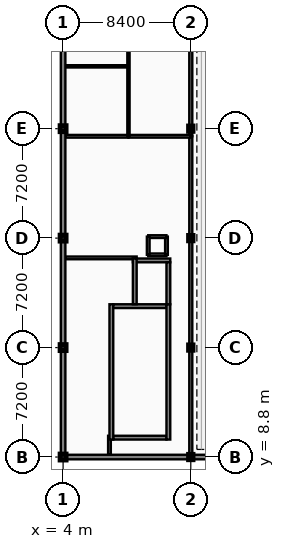
"""IFC4 building model, lengths in metres.
Left out: names, types, materials, properties, quantities, classifications, styles, units other than length and angle.
Written with IfcOpenShell. Run it as: python <this file> out.ifc"""

import sys

from ifc_helpers import new_model, si_unit, direction, frame, frame_2d, origin, origin_2d, place, context, subcontext, project, spatial, rectangle, i_section, extrude, element, fill, save


model = new_model("IFC4")
c1 = context("Model", 3, precision=1e-05, world=origin(), true_north=direction((0.0, 1.0)))
c2 = subcontext(c1, "Body", "Model", "MODEL_VIEW")
j1 = project(units=[si_unit("LENGTHUNIT", "METRE"), si_unit("PLANEANGLEUNIT", "RADIAN")], contexts=[c1])
p1 = place(None, origin())
s1 = spatial("IfcSite", under=j1, at=p1, CompositionType="ELEMENT")
p2 = place(p1, origin())
s2 = spatial("IfcBuilding", under=s1, at=p2, CompositionType="ELEMENT")
p3 = place(p2, frame((0.0, 0.0, 5.4)))
s3 = spatial("IfcBuildingStorey", under=s2, at=p3, CompositionType="ELEMENT", Elevation=5.4)
for number, where, z_axis, x_axis in (
    (1, (4.0, 8.8, 0.0), (0.0, 0.0, 1.0), (1.0, 0.0, 0.0)),
    (2, (4.0, 16.0, 0.0), (0.0, 0.0, 1.0), (1.0, 0.0, 0.0)),
    (3, (4.0, 23.2, 0.0), (0.0, 0.0, 1.0), (1.0, 0.0, 0.0)),
    (4, (4.0, 30.4, 0.0), (0.0, 0.0, 1.0), (1.0, 0.0, 0.0)),
):
    element("IfcColumn", number, at=place(p3, frame(where, z_axis=z_axis, x_axis=x_axis)), inside=s3, PredefinedType="COLUMN", context=c2, shape_type="SweptSolid", body=[
        extrude(rectangle(XDim=0.4, YDim=0.4, at=origin_2d()), origin(), (0.0, 0.0, 1.0), 4.2),
    ])
for number, where, z_axis, x_axis in (
    (5, (12.4, 8.8, 0.0), (0.0, 0.0, 1.0), (1.0, 0.0, 0.0)),
    (6, (12.4, 16.0, 0.0), (0.0, 0.0, 1.0), (1.0, 0.0, 0.0)),
    (7, (12.4, 23.2, 0.0), (0.0, 0.0, 1.0), (1.0, 0.0, 0.0)),
    (8, (12.4, 30.4, 0.0), (0.0, 0.0, 1.0), (1.0, 0.0, 0.0)),
):
    element("IfcColumn", number, at=place(p3, frame(where, z_axis=z_axis, x_axis=x_axis)), inside=s3, PredefinedType="COLUMN", context=c2, shape_type="SweptSolid", body=[
        extrude(i_section(OverallWidth=0.3, OverallDepth=0.36, WebThickness=0.012, FlangeThickness=0.022, at=origin_2d()), origin(), (0.0, 0.0, 1.0), 4.2),
    ])
p4 = place(p3, frame((7.05, 8.96, 0.0), z_axis=(0.0, 0.0, 1.0), x_axis=(0.0, 1.0, 0.0)))
e9 = element("IfcWall", 9, at=p4, inside=s3, PredefinedType="PARTITIONING", context=c2, shape_type="SweptSolid", body=[
    extrude(rectangle(XDim=1.24, YDim=0.18, at=frame_2d((0.62, 0.0))), origin(), (0.0, 0.0, 1.0), 3.5),
])
p5 = place(p3, frame((4.16, 21.9, 0.0), z_axis=(0.0, 0.0, 1.0), x_axis=(1.0, 0.0, 0.0)))
e10 = element("IfcWall", 10, at=p5, inside=s3, PredefinedType="PARTITIONING", context=c2, shape_type="SweptSolid", body=[
    extrude(rectangle(XDim=4.68, YDim=0.18, at=frame_2d((2.34, 0.0))), origin(), (0.0, 0.0, 1.0), 3.5),
])
p6 = place(p3, frame((12.4, 8.96, 0.0), z_axis=(0.0, 0.0, 1.0), x_axis=(0.0, 1.0, 0.0)))
e11 = element("IfcWall", 11, at=p6, inside=s3, PredefinedType="PARTITIONING", context=c2, shape_type="SweptSolid", body=[
    extrude(rectangle(XDim=20.94, YDim=0.2, at=frame_2d((10.47, 0.0))), origin(), (0.0, 0.0, 1.0), 3.35),
])
p7 = place(p6, frame((8.613, 0.0, -0.01)))
e12 = element("IfcOpeningElement", 12, at=p7, cuts=e11, PredefinedType="OPENING", context=c2, shape_type="SweptSolid", body=[
    extrude(rectangle(XDim=1.8, YDim=2.26, at=frame_2d((0.9, 1.13))), frame((0.0, 0.11, 0.0), z_axis=(0.0, -1.0, 0.0), x_axis=(1.0, 0.0, 0.0)), (0.0, 0.0, 1.0), 0.22),
])
p8 = place(p3, frame((12.4, 29.9, 0.0), z_axis=(0.0, 0.0, 1.0), x_axis=(0.0, 1.0, 0.0)))
e13 = element("IfcWall", 13, at=p8, inside=s3, PredefinedType="PARTITIONING", context=c2, shape_type="SweptSolid", body=[
    extrude(rectangle(XDim=7.56, YDim=0.2, at=frame_2d((3.78, 0.0))), origin(), (0.0, 0.0, 1.0), 3.23),
])
p9 = place(p3, frame((4.16, 29.9, 0.0), z_axis=(0.0, 0.0, 1.0), x_axis=(1.0, 0.0, 0.0)))
e14 = element("IfcWall", 14, at=p9, inside=s3, PredefinedType="PARTITIONING", context=c2, shape_type="SweptSolid", body=[
    extrude(rectangle(XDim=4.14, YDim=0.18, at=frame_2d((2.07, 0.0))), origin(), (0.0, 0.0, 1.0), 3.5),
])
p10 = place(p9, frame((1.57, 0.0, -0.01)))
e15 = element("IfcOpeningElement", 15, at=p10, cuts=e14, PredefinedType="OPENING", context=c2, shape_type="SweptSolid", body=[
    extrude(rectangle(XDim=1.0, YDim=2.16, at=frame_2d((0.5, 1.08))), frame((0.0, 0.1, 0.0), z_axis=(0.0, -1.0, 0.0), x_axis=(1.0, 0.0, 0.0)), (0.0, 0.0, 1.0), 0.2),
])
p11 = place(p3, frame((8.3, 29.9, 0.0), z_axis=(0.0, 0.0, 1.0), x_axis=(1.0, 0.0, 0.0)))
e16 = element("IfcWall", 16, at=p11, inside=s3, PredefinedType="PARTITIONING", context=c2, shape_type="SweptSolid", body=[
    extrude(rectangle(XDim=4.1, YDim=0.18, at=frame_2d((2.05, 0.0))), origin(), (0.0, 0.0, 1.0), 3.35),
])
p12 = place(p11, frame((1.55, 0.0, -0.01)))
e17 = element("IfcOpeningElement", 17, at=p12, cuts=e16, PredefinedType="OPENING", context=c2, shape_type="SweptSolid", body=[
    extrude(rectangle(XDim=1.0, YDim=2.16, at=frame_2d((0.5, 1.08))), frame((0.0, 0.1, 0.0), z_axis=(0.0, -1.0, 0.0), x_axis=(1.0, 0.0, 0.0)), (0.0, 0.0, 1.0), 0.2),
])
p13 = place(p3, frame((8.3, 29.9, 0.0), z_axis=(0.0, 0.0, 1.0), x_axis=(0.0, 1.0, 0.0)))
e18 = element("IfcWall", 18, at=p13, inside=s3, PredefinedType="PARTITIONING", context=c2, shape_type="SweptSolid", body=[
    extrude(rectangle(XDim=7.56, YDim=0.15, at=frame_2d((3.78, 0.0))), origin(), (0.0, 0.0, 1.0), 3.23),
])
p14 = place(p3, frame((4.16, 34.5, 0.0), z_axis=(0.0, 0.0, 1.0), x_axis=(1.0, 0.0, 0.0)))
e19 = element("IfcWall", 19, at=p14, inside=s3, PredefinedType="PARTITIONING", context=c2, shape_type="SweptSolid", body=[
    extrude(rectangle(XDim=4.14, YDim=0.15, at=frame_2d((2.07, 0.0))), origin(), (0.0, 0.0, 1.0), 3.5),
])
p15 = place(p14, frame((1.595, 0.0, -0.01)))
e20 = element("IfcOpeningElement", 20, at=p15, cuts=e19, PredefinedType="OPENING", context=c2, shape_type="SweptSolid", body=[
    extrude(rectangle(XDim=0.95, YDim=2.16, at=frame_2d((0.475, 1.08))), frame((0.0, 0.085, 0.0), z_axis=(0.0, -1.0, 0.0), x_axis=(1.0, 0.0, 0.0)), (0.0, 0.0, 1.0), 0.17),
])
p16 = place(p3, frame((4.0, 8.8, 0.0), z_axis=(0.0, 0.0, 1.0), x_axis=(1.0, 0.0, 0.0)))
e21 = element("IfcWall", 21, at=p16, inside=s3, PredefinedType="SOLIDWALL", context=c2, shape_type="SweptSolid", body=[
    extrude(rectangle(XDim=8.4, YDim=0.3, at=frame_2d((4.2, 0.0))), origin(), (0.0, 0.0, 1.0), 3.35),
])
p17 = place(p16, frame((0.46, 0.0, 0.85)))
e22 = element("IfcOpeningElement", 22, at=p17, cuts=e21, PredefinedType="OPENING", context=c2, shape_type="SweptSolid", body=[
    extrude(rectangle(XDim=0.9, YDim=2.15, at=frame_2d((0.45, 1.075))), frame((0.0, 0.16, 0.0), z_axis=(0.0, -1.0, 0.0), x_axis=(1.0, 0.0, 0.0)), (0.0, 0.0, 1.0), 0.32),
])
p18 = place(p16, frame((6.86, 0.0, 0.85)))
e23 = element("IfcOpeningElement", 23, at=p18, cuts=e21, PredefinedType="OPENING", context=c2, shape_type="SweptSolid", body=[
    extrude(rectangle(XDim=0.9, YDim=2.15, at=frame_2d((0.45, 1.075))), frame((0.0, 0.16, 0.0), z_axis=(0.0, -1.0, 0.0), x_axis=(1.0, 0.0, 0.0)), (0.0, 0.0, 1.0), 0.32),
])
p19 = place(p3, frame((12.4, 8.8, 0.0), z_axis=(0.0, 0.0, 1.0), x_axis=(1.0, 0.0, 0.0)))
e24 = element("IfcWall", 24, at=p19, inside=s3, PredefinedType="SOLIDWALL", context=c2, shape_type="SweptSolid", body=[
    extrude(rectangle(XDim=8.4, YDim=0.3, at=frame_2d((4.2, 0.0))), origin(), (0.0, 0.0, 1.0), 3.35),
])
p20 = place(p19, frame((0.46, 0.0, 0.85)))
e25 = element("IfcOpeningElement", 25, at=p20, cuts=e24, PredefinedType="OPENING", context=c2, shape_type="SweptSolid", body=[
    extrude(rectangle(XDim=0.9, YDim=2.15, at=frame_2d((0.45, 1.075))), frame((0.0, 0.16, 0.0), z_axis=(0.0, -1.0, 0.0), x_axis=(1.0, 0.0, 0.0)), (0.0, 0.0, 1.0), 0.32),
])
p21 = place(p19, frame((6.86, 0.0, 0.85)))
e26 = element("IfcOpeningElement", 26, at=p21, cuts=e24, PredefinedType="OPENING", context=c2, shape_type="SweptSolid", body=[
    extrude(rectangle(XDim=0.9, YDim=2.15, at=frame_2d((0.45, 1.075))), frame((0.0, 0.16, 0.0), z_axis=(0.0, -1.0, 0.0), x_axis=(1.0, 0.0, 0.0)), (0.0, 0.0, 1.0), 0.32),
])
for number, where, z_axis, x_axis in (
    (27, (4.0, 16.0, 0.0), (0.0, 0.0, 1.0), (0.0, -1.0, 0.0)),
    (28, (4.0, 23.2, 0.0), (0.0, 0.0, 1.0), (0.0, -1.0, 0.0)),
):
    element("IfcWall", number, at=place(p3, frame(where, z_axis=z_axis, x_axis=x_axis)), inside=s3, PredefinedType="SOLIDWALL", context=c2, shape_type="SweptSolid", body=[
        extrude(rectangle(XDim=7.2, YDim=0.3, at=frame_2d((3.6, 0.0))), origin(), (0.0, 0.0, 1.0), 3.5),
    ])
p22 = place(p3, frame((4.0, 30.4, 0.0), z_axis=(0.0, 0.0, 1.0), x_axis=(0.0, -1.0, 0.0)))
e29 = element("IfcWall", 29, at=p22, inside=s3, PredefinedType="SOLIDWALL", context=c2, shape_type="SweptSolid", body=[
    extrude(rectangle(XDim=7.2, YDim=0.3, at=frame_2d((3.6, 0.0))), origin(), (0.0, 0.0, 1.0), 3.23),
])
p23 = place(p22, frame((0.86, 0.0, 0.85)))
e30 = element("IfcOpeningElement", 30, at=p23, cuts=e29, PredefinedType="OPENING", context=c2, shape_type="SweptSolid", body=[
    extrude(rectangle(XDim=0.9, YDim=2.15, at=frame_2d((0.45, 1.075))), frame((0.0, 0.16, 0.0), z_axis=(0.0, -1.0, 0.0), x_axis=(1.0, 0.0, 0.0)), (0.0, 0.0, 1.0), 0.32),
])
p24 = place(p22, frame((5.66, 0.0, 0.85)))
e31 = element("IfcOpeningElement", 31, at=p24, cuts=e29, PredefinedType="OPENING", context=c2, shape_type="SweptSolid", body=[
    extrude(rectangle(XDim=0.9, YDim=2.15, at=frame_2d((0.45, 1.075))), frame((0.0, 0.16, 0.0), z_axis=(0.0, -1.0, 0.0), x_axis=(1.0, 0.0, 0.0)), (0.0, 0.0, 1.0), 0.32),
])
p25 = place(p3, frame((4.0, 37.6, 0.0), z_axis=(0.0, 0.0, 1.0), x_axis=(0.0, -1.0, 0.0)))
e32 = element("IfcWall", 32, at=p25, inside=s3, PredefinedType="SOLIDWALL", context=c2, shape_type="SweptSolid", body=[
    extrude(rectangle(XDim=7.2, YDim=0.3, at=frame_2d((3.6, 0.0))), origin(), (0.0, 0.0, 1.0), 3.23),
])
p26 = place(p25, frame((0.46, 0.0, 0.85)))
e33 = element("IfcOpeningElement", 33, at=p26, cuts=e32, PredefinedType="OPENING", context=c2, shape_type="SweptSolid", body=[
    extrude(rectangle(XDim=0.9, YDim=2.15, at=frame_2d((0.45, 1.075))), frame((0.0, 0.16, 0.0), z_axis=(0.0, -1.0, 0.0), x_axis=(1.0, 0.0, 0.0)), (0.0, 0.0, 1.0), 0.32),
])
p27 = place(p25, frame((5.66, 0.0, 0.85)))
e34 = element("IfcOpeningElement", 34, at=p27, cuts=e32, PredefinedType="OPENING", context=c2, shape_type="SweptSolid", body=[
    extrude(rectangle(XDim=0.9, YDim=2.15, at=frame_2d((0.45, 1.075))), frame((0.0, 0.16, 0.0), z_axis=(0.0, -1.0, 0.0), x_axis=(1.0, 0.0, 0.0)), (0.0, 0.0, 1.0), 0.32),
])
p28 = place(p3, frame((7.3, 10.075, 0.0), z_axis=(0.0, 0.0, 1.0), x_axis=(1.0, 0.0, 0.0)))
e35 = element("IfcWall", 35, at=p28, inside=s3, PredefinedType="SHEAR", context=c2, shape_type="SweptSolid", body=[
    extrude(rectangle(XDim=3.5, YDim=0.25, at=frame_2d((1.75, 0.0))), origin(), (0.0, 0.0, 1.0), 4.2),
])
p29 = place(p28, frame((1.1, 0.0, -0.01)))
e36 = element("IfcOpeningElement", 36, at=p29, cuts=e35, PredefinedType="OPENING", context=c2, shape_type="SweptSolid", body=[
    extrude(rectangle(XDim=1.3, YDim=2.16, at=frame_2d((0.65, 1.08))), frame((0.0, 0.135, 0.0), z_axis=(0.0, -1.0, 0.0), x_axis=(1.0, 0.0, 0.0)), (0.0, 0.0, 1.0), 0.27),
])
p30 = place(p3, frame((7.175, 9.95, 0.0), z_axis=(0.0, 0.0, 1.0), x_axis=(0.0, 1.0, 0.0)))
e37 = element("IfcWall", 37, at=p30, inside=s3, PredefinedType="SHEAR", context=c2, shape_type="SweptSolid", body=[
    extrude(rectangle(XDim=8.9, YDim=0.25, at=frame_2d((4.45, 0.0))), origin(), (0.0, 0.0, 1.0), 4.2),
])
p31 = place(p3, frame((10.8, 18.725, 0.0), z_axis=(0.0, 0.0, 1.0), x_axis=(-1.0, 0.0, 0.0)))
e38 = element("IfcWall", 38, at=p31, inside=s3, PredefinedType="SHEAR", context=c2, shape_type="SweptSolid", body=[
    extrude(rectangle(XDim=3.5, YDim=0.25, at=frame_2d((1.75, 0.0))), origin(), (0.0, 0.0, 1.0), 4.2),
])
p32 = place(p3, frame((10.925, 9.95, 0.0), z_axis=(0.0, 0.0, 1.0), x_axis=(0.0, 1.0, 0.0)))
e39 = element("IfcWall", 39, at=p32, inside=s3, PredefinedType="SHEAR", context=c2, shape_type="SweptSolid", body=[
    extrude(rectangle(XDim=8.9, YDim=0.25, at=frame_2d((4.45, 0.0))), origin(), (0.0, 0.0, 1.0), 4.2),
])
p33 = place(p3, frame((8.59, 21.735, 0.0), z_axis=(0.0, 0.0, 1.0), x_axis=(1.0, 0.0, 0.0)))
e40 = element("IfcWall", 40, at=p33, inside=s3, PredefinedType="SHEAR", context=c2, shape_type="SweptSolid", body=[
    extrude(rectangle(XDim=2.46, YDim=0.25, at=frame_2d((1.23, 0.0))), origin(), (0.0, 0.0, 1.0), 4.2),
])
p34 = place(p3, frame((10.925, 18.85, 0.0), z_axis=(0.0, 0.0, 1.0), x_axis=(0.0, 1.0, 0.0)))
e41 = element("IfcWall", 41, at=p34, inside=s3, PredefinedType="SHEAR", context=c2, shape_type="SweptSolid", body=[
    extrude(rectangle(XDim=2.76, YDim=0.25, at=frame_2d((1.38, 0.0))), origin(), (0.0, 0.0, 1.0), 4.2),
])
p35 = place(p34, frame((0.83, 0.0, -0.01)))
e42 = element("IfcOpeningElement", 42, at=p35, cuts=e41, PredefinedType="OPENING", context=c2, shape_type="SweptSolid", body=[
    extrude(rectangle(XDim=1.1, YDim=2.16, at=frame_2d((0.55, 1.08))), frame((0.0, 0.135, 0.0), z_axis=(0.0, -1.0, 0.0), x_axis=(1.0, 0.0, 0.0)), (0.0, 0.0, 1.0), 0.27),
])
p36 = place(p3, frame((8.715, 18.85, 0.0), z_axis=(0.0, 0.0, 1.0), x_axis=(0.0, 1.0, 0.0)))
e43 = element("IfcWall", 43, at=p36, inside=s3, PredefinedType="SHEAR", context=c2, shape_type="SweptSolid", body=[
    extrude(rectangle(XDim=3.01, YDim=0.25, at=frame_2d((1.505, 0.0))), origin(), (0.0, 0.0, 1.0), 4.2),
])
p37 = place(p3, frame((9.6, 22.1, 0.0), z_axis=(0.0, 0.0, 1.0), x_axis=(1.0, 0.0, 0.0)))
e44 = element("IfcWall", 44, at=p37, inside=s3, PredefinedType="SOLIDWALL", context=c2, shape_type="SweptSolid", body=[
    extrude(rectangle(XDim=1.2, YDim=0.18, at=frame_2d((0.6, 0.0))), origin(), (0.0, 0.0, 1.0), 3.97),
])
p38 = place(p3, frame((10.8, 22.1, 0.0), z_axis=(0.0, 0.0, 1.0), x_axis=(0.0, 1.0, 0.0)))
e45 = element("IfcWall", 45, at=p38, inside=s3, PredefinedType="SOLIDWALL", context=c2, shape_type="SweptSolid", body=[
    extrude(rectangle(XDim=1.2, YDim=0.18, at=frame_2d((0.6, 0.0))), origin(), (0.0, 0.0, 1.0), 3.97),
])
p39 = place(p38, frame((0.2, 0.0, -0.01)))
e46 = element("IfcOpeningElement", 46, at=p39, cuts=e45, PredefinedType="OPENING", context=c2, shape_type="SweptSolid", body=[
    extrude(rectangle(XDim=0.8, YDim=2.06, at=frame_2d((0.4, 1.03))), frame((0.0, 0.1, 0.0), z_axis=(0.0, -1.0, 0.0), x_axis=(1.0, 0.0, 0.0)), (0.0, 0.0, 1.0), 0.2),
])
for number, where, z_axis, x_axis in (
    (47, (10.8, 23.3, 0.0), (0.0, 0.0, 1.0), (-1.0, 0.0, 0.0)),
    (48, (9.6, 23.3, 0.0), (0.0, 0.0, 1.0), (0.0, -1.0, 0.0)),
):
    element("IfcWall", number, at=place(p3, frame(where, z_axis=z_axis, x_axis=x_axis)), inside=s3, PredefinedType="SOLIDWALL", context=c2, shape_type="SweptSolid", body=[
        extrude(rectangle(XDim=1.2, YDim=0.18, at=frame_2d((0.6, 0.0))), origin(), (0.0, 0.0, 1.0), 3.97),
    ])
p40 = place(p7, frame((1.8, 0.0, 0.01), z_axis=(0.0, 0.0, 1.0), x_axis=(-1.0, 0.0, 0.0)))
e49 = element("IfcDoor", 49, at=p40, inside=s3, OperationType="DOUBLE_SWING_LEFT", PredefinedType="DOOR", context=c2, shape_type="SweptSolid", body=[
    extrude(rectangle(XDim=1.8, YDim=2.25, at=frame_2d((0.9, 1.125))), frame((0.0, 0.025, 0.0), z_axis=(0.0, -1.0, 0.0), x_axis=(1.0, 0.0, 0.0)), (0.0, 0.0, 1.0), 0.05),
])
fill(e12, e49)
p41 = place(p10, frame((0.0, 0.0, 0.01)))
e50 = element("IfcDoor", 50, at=p41, inside=s3, OperationType="SINGLE_SWING_LEFT", PredefinedType="DOOR", context=c2, shape_type="SweptSolid", body=[
    extrude(rectangle(XDim=1.0, YDim=2.15, at=frame_2d((0.5, 1.075))), frame((0.0, 0.025, 0.0), z_axis=(0.0, -1.0, 0.0), x_axis=(1.0, 0.0, 0.0)), (0.0, 0.0, 1.0), 0.05),
])
fill(e15, e50)
p42 = place(p12, frame((0.0, 0.0, 0.01)))
e51 = element("IfcDoor", 51, at=p42, inside=s3, OperationType="SINGLE_SWING_RIGHT", PredefinedType="DOOR", context=c2, shape_type="SweptSolid", body=[
    extrude(rectangle(XDim=1.0, YDim=2.15, at=frame_2d((0.5, 1.075))), frame((0.0, 0.025, 0.0), z_axis=(0.0, -1.0, 0.0), x_axis=(1.0, 0.0, 0.0)), (0.0, 0.0, 1.0), 0.05),
])
fill(e17, e51)
p43 = place(p15, frame((0.95, 0.0, 0.01), z_axis=(0.0, 0.0, 1.0), x_axis=(-1.0, 0.0, 0.0)))
e52 = element("IfcDoor", 52, at=p43, inside=s3, OperationType="SINGLE_SWING_LEFT", PredefinedType="DOOR", context=c2, shape_type="SweptSolid", body=[
    extrude(rectangle(XDim=0.95, YDim=2.15, at=frame_2d((0.475, 1.075))), frame((0.0, 0.025, 0.0), z_axis=(0.0, -1.0, 0.0), x_axis=(1.0, 0.0, 0.0)), (0.0, 0.0, 1.0), 0.05),
])
fill(e20, e52)
p44 = place(p17, origin())
e53 = element("IfcWindow", 53, at=p44, inside=s3, PartitioningType="SINGLE_PANEL", PredefinedType="WINDOW", context=c2, shape_type="SweptSolid", body=[
    extrude(rectangle(XDim=0.9, YDim=2.15, at=frame_2d((0.45, 1.075))), frame((0.0, 0.03, 0.0), z_axis=(0.0, -1.0, 0.0), x_axis=(1.0, 0.0, 0.0)), (0.0, 0.0, 1.0), 0.06),
])
fill(e22, e53)
p45 = place(p18, origin())
e54 = element("IfcWindow", 54, at=p45, inside=s3, PartitioningType="SINGLE_PANEL", PredefinedType="WINDOW", context=c2, shape_type="SweptSolid", body=[
    extrude(rectangle(XDim=0.9, YDim=2.15, at=frame_2d((0.45, 1.075))), frame((0.0, 0.03, 0.0), z_axis=(0.0, -1.0, 0.0), x_axis=(1.0, 0.0, 0.0)), (0.0, 0.0, 1.0), 0.06),
])
fill(e23, e54)
p46 = place(p20, origin())
e55 = element("IfcWindow", 55, at=p46, inside=s3, PartitioningType="SINGLE_PANEL", PredefinedType="WINDOW", context=c2, shape_type="SweptSolid", body=[
    extrude(rectangle(XDim=0.9, YDim=2.15, at=frame_2d((0.45, 1.075))), frame((0.0, 0.03, 0.0), z_axis=(0.0, -1.0, 0.0), x_axis=(1.0, 0.0, 0.0)), (0.0, 0.0, 1.0), 0.06),
])
fill(e25, e55)
p47 = place(p23, origin())
e56 = element("IfcWindow", 56, at=p47, inside=s3, PartitioningType="SINGLE_PANEL", PredefinedType="WINDOW", context=c2, shape_type="SweptSolid", body=[
    extrude(rectangle(XDim=0.9, YDim=2.15, at=frame_2d((0.45, 1.075))), frame((0.0, 0.03, 0.0), z_axis=(0.0, -1.0, 0.0), x_axis=(1.0, 0.0, 0.0)), (0.0, 0.0, 1.0), 0.06),
])
fill(e30, e56)
p48 = place(p24, origin())
e57 = element("IfcWindow", 57, at=p48, inside=s3, PartitioningType="SINGLE_PANEL", PredefinedType="WINDOW", context=c2, shape_type="SweptSolid", body=[
    extrude(rectangle(XDim=0.9, YDim=2.15, at=frame_2d((0.45, 1.075))), frame((0.0, 0.03, 0.0), z_axis=(0.0, -1.0, 0.0), x_axis=(1.0, 0.0, 0.0)), (0.0, 0.0, 1.0), 0.06),
])
fill(e31, e57)
p49 = place(p27, origin())
e58 = element("IfcWindow", 58, at=p49, inside=s3, PartitioningType="SINGLE_PANEL", PredefinedType="WINDOW", context=c2, shape_type="SweptSolid", body=[
    extrude(rectangle(XDim=0.9, YDim=2.15, at=frame_2d((0.45, 1.075))), frame((0.0, 0.03, 0.0), z_axis=(0.0, -1.0, 0.0), x_axis=(1.0, 0.0, 0.0)), (0.0, 0.0, 1.0), 0.06),
])
fill(e34, e58)
p50 = place(p29, frame((0.0, 0.0, 0.01)))
e59 = element("IfcDoor", 59, at=p50, inside=s3, OperationType="SINGLE_SWING_RIGHT", PredefinedType="DOOR", context=c2, shape_type="SweptSolid", body=[
    extrude(rectangle(XDim=1.3, YDim=2.15, at=frame_2d((0.65, 1.075))), frame((0.0, 0.025, 0.0), z_axis=(0.0, -1.0, 0.0), x_axis=(1.0, 0.0, 0.0)), (0.0, 0.0, 1.0), 0.05),
])
fill(e36, e59)
p51 = place(p35, frame((0.0, 0.0, 0.01)))
e60 = element("IfcDoor", 60, at=p51, inside=s3, OperationType="SLIDING_TO_LEFT", PredefinedType="DOOR", context=c2, shape_type="SweptSolid", body=[
    extrude(rectangle(XDim=1.1, YDim=2.15, at=frame_2d((0.55, 1.075))), frame((0.0, 0.025, 0.0), z_axis=(0.0, -1.0, 0.0), x_axis=(1.0, 0.0, 0.0)), (0.0, 0.0, 1.0), 0.05),
])
fill(e42, e60)
p52 = place(p39, frame((0.0, 0.0, 0.01)))
e61 = element("IfcDoor", 61, at=p52, inside=s3, OperationType="SINGLE_SWING_RIGHT", PredefinedType="DOOR", context=c2, shape_type="SweptSolid", body=[
    extrude(rectangle(XDim=0.8, YDim=2.05, at=frame_2d((0.4, 1.025))), frame((0.0, 0.025, 0.0), z_axis=(0.0, -1.0, 0.0), x_axis=(1.0, 0.0, 0.0)), (0.0, 0.0, 1.0), 0.05),
])
fill(e46, e61)
save(model, sys.argv[1])
